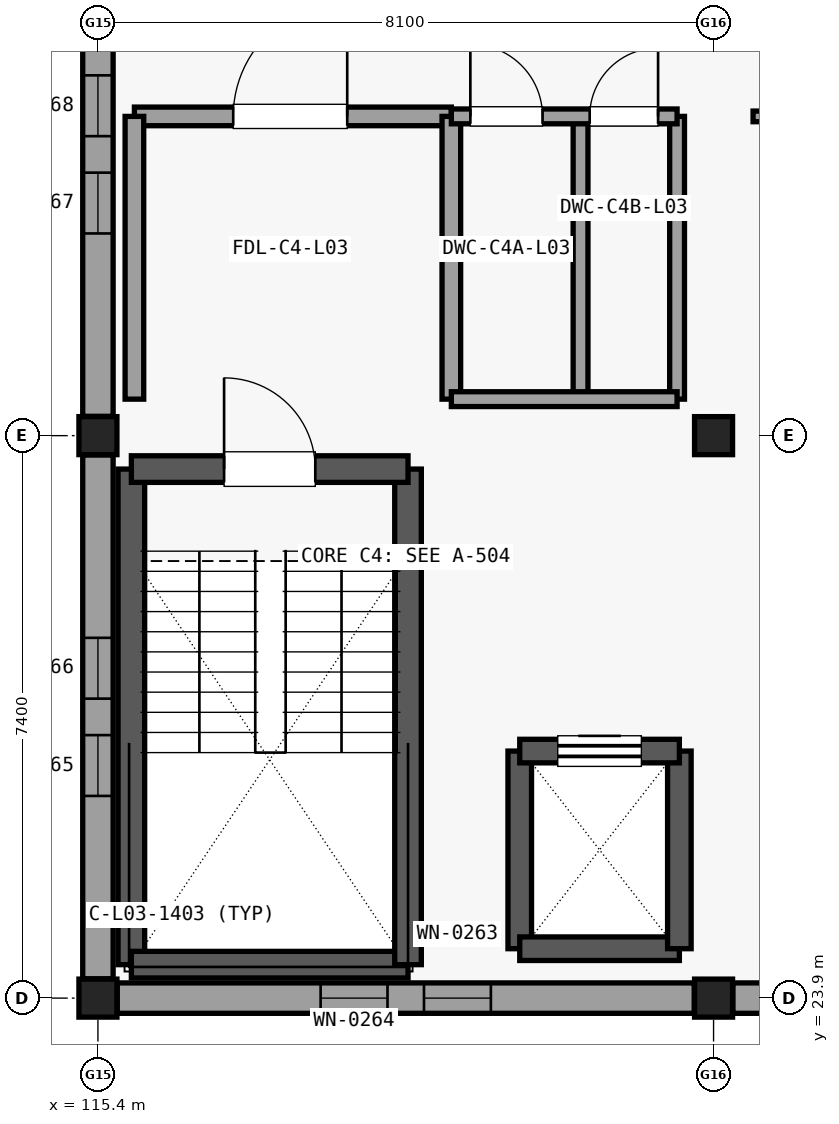
"""IFC4 building model, lengths in metres.
Left out: names, types, materials, properties, quantities, classifications, styles, units other than length and angle.
Written with IfcOpenShell. Run it as: python <this file> out.ifc"""

import sys

from ifc_helpers import new_model, si_unit, direction, frame, frame_2d, origin, origin_2d, place, context, subcontext, project, spatial, rectangle, extrude, element, fill, save


model = new_model("IFC4")
c1 = context("Model", 3, precision=1e-05, world=origin(), true_north=direction((0.0, 1.0)))
c2 = subcontext(c1, "Body", "Model", "MODEL_VIEW")
j1 = project(units=[si_unit("LENGTHUNIT", "METRE"), si_unit("PLANEANGLEUNIT", "RADIAN")], contexts=[c1])
p1 = place(None, origin())
s1 = spatial("IfcSite", under=j1, at=p1, CompositionType="ELEMENT")
p2 = place(p1, origin())
s2 = spatial("IfcBuilding", under=s1, at=p2, CompositionType="ELEMENT")
p3 = place(p2, frame((0.0, 0.0, 13.8)))
s3 = spatial("IfcBuildingStorey", under=s2, at=p3, CompositionType="ELEMENT", Elevation=13.8)
for number, where, z_axis, x_axis in (
    (1, (115.4, 23.9, 0.0), (0.0, 0.0, 1.0), (1.0, 0.0, 0.0)),
    (2, (115.4, 31.3, 0.0), (0.0, 0.0, 1.0), (1.0, 0.0, 0.0)),
    (3, (123.5, 23.9, 0.0), (0.0, 0.0, 1.0), (1.0, 0.0, 0.0)),
    (4, (123.5, 31.3, 0.0), (0.0, 0.0, 1.0), (1.0, 0.0, 0.0)),
):
    element("IfcColumn", number, at=place(p3, frame(where, z_axis=z_axis, x_axis=x_axis)), inside=s3, PredefinedType="COLUMN", context=c2, shape_type="SweptSolid", body=[
        extrude(rectangle(XDim=0.5, YDim=0.5, at=origin_2d()), origin(), (0.0, 0.0, 1.0), 3.38),
    ])
p4 = place(p3, frame((123.246, 23.9, 0.0), z_axis=(0.0, 0.0, 1.0), x_axis=(-1.0, 0.0, 0.0)))
e5 = element("IfcWall", 5, at=p4, inside=s3, PredefinedType="SOLIDWALL", context=c2, shape_type="SweptSolid", body=[
    extrude(rectangle(XDim=7.592, YDim=0.4, at=frame_2d((3.796, 0.0))), origin(), (0.0, 0.0, 1.0), 2.908),
])
p5 = place(p4, frame((2.676, 0.0, 0.6)))
e6 = element("IfcOpeningElement", 6, at=p5, cuts=e5, PredefinedType="OPENING", context=c2, shape_type="SweptSolid", body=[
    extrude(rectangle(XDim=0.88, YDim=1.9, at=frame_2d((0.44, 0.95))), frame((0.0, 0.21, 0.0), z_axis=(0.0, -1.0, 0.0), x_axis=(1.0, 0.0, 0.0)), (0.0, 0.0, 1.0), 0.42),
])
p6 = place(p4, frame((4.036, 0.0, 0.6)))
e7 = element("IfcOpeningElement", 7, at=p6, cuts=e5, PredefinedType="OPENING", context=c2, shape_type="SweptSolid", body=[
    extrude(rectangle(XDim=0.88, YDim=1.9, at=frame_2d((0.44, 0.95))), frame((0.0, 0.21, 0.0), z_axis=(0.0, -1.0, 0.0), x_axis=(1.0, 0.0, 0.0)), (0.0, 0.0, 1.0), 0.42),
])
p7 = place(p3, frame((115.4, 24.154, 0.0), z_axis=(0.0, 0.0, 1.0), x_axis=(0.0, 1.0, 0.0)))
e8 = element("IfcWall", 8, at=p7, inside=s3, PredefinedType="SOLIDWALL", context=c2, shape_type="SweptSolid", body=[
    extrude(rectangle(XDim=6.892, YDim=0.4, at=frame_2d((3.446, 0.0))), origin(), (0.0, 0.0, 1.0), 2.908),
])
p8 = place(p7, frame((2.406, 0.0, 0.6)))
e9 = element("IfcOpeningElement", 9, at=p8, cuts=e8, PredefinedType="OPENING", context=c2, shape_type="SweptSolid", body=[
    extrude(rectangle(XDim=0.8, YDim=1.92, at=frame_2d((0.4, 0.96))), frame((0.0, 0.21, 0.0), z_axis=(0.0, -1.0, 0.0), x_axis=(1.0, 0.0, 0.0)), (0.0, 0.0, 1.0), 0.42),
])
p9 = place(p7, frame((3.686, 0.0, 0.6)))
e10 = element("IfcOpeningElement", 10, at=p9, cuts=e8, PredefinedType="OPENING", context=c2, shape_type="SweptSolid", body=[
    extrude(rectangle(XDim=0.8, YDim=1.92, at=frame_2d((0.4, 0.96))), frame((0.0, 0.21, 0.0), z_axis=(0.0, -1.0, 0.0), x_axis=(1.0, 0.0, 0.0)), (0.0, 0.0, 1.0), 0.42),
])
p10 = place(p3, frame((115.4, 31.554, 0.0), z_axis=(0.0, 0.0, 1.0), x_axis=(0.0, 1.0, 0.0)))
e11 = element("IfcWall", 11, at=p10, inside=s3, PredefinedType="SOLIDWALL", context=c2, shape_type="SweptSolid", body=[
    extrude(rectangle(XDim=6.892, YDim=0.4, at=frame_2d((3.446, 0.0))), origin(), (0.0, 0.0, 1.0), 2.908),
])
p11 = place(p10, frame((2.406, 0.0, 0.6)))
e12 = element("IfcOpeningElement", 12, at=p11, cuts=e11, PredefinedType="OPENING", context=c2, shape_type="SweptSolid", body=[
    extrude(rectangle(XDim=0.8, YDim=1.92, at=frame_2d((0.4, 0.96))), frame((0.0, 0.21, 0.0), z_axis=(0.0, -1.0, 0.0), x_axis=(1.0, 0.0, 0.0)), (0.0, 0.0, 1.0), 0.42),
])
p12 = place(p10, frame((3.686, 0.0, 0.6)))
e13 = element("IfcOpeningElement", 13, at=p12, cuts=e11, PredefinedType="OPENING", context=c2, shape_type="SweptSolid", body=[
    extrude(rectangle(XDim=0.8, YDim=1.92, at=frame_2d((0.4, 0.96))), frame((0.0, 0.21, 0.0), z_axis=(0.0, -1.0, 0.0), x_axis=(1.0, 0.0, 0.0)), (0.0, 0.0, 1.0), 0.42),
])
p13 = place(p3, frame((131.346, 23.9, 0.0), z_axis=(0.0, 0.0, 1.0), x_axis=(-1.0, 0.0, 0.0)))
e14 = element("IfcWall", 14, at=p13, inside=s3, PredefinedType="SOLIDWALL", context=c2, shape_type="SweptSolid", body=[
    extrude(rectangle(XDim=7.592, YDim=0.4, at=frame_2d((3.796, 0.0))), origin(), (0.0, 0.0, 1.0), 2.908),
])
p14 = place(p13, frame((2.676, 0.0, 0.6)))
e15 = element("IfcOpeningElement", 15, at=p14, cuts=e14, PredefinedType="OPENING", context=c2, shape_type="SweptSolid", body=[
    extrude(rectangle(XDim=0.88, YDim=1.9, at=frame_2d((0.44, 0.95))), frame((0.0, 0.21, 0.0), z_axis=(0.0, -1.0, 0.0), x_axis=(1.0, 0.0, 0.0)), (0.0, 0.0, 1.0), 0.42),
])
p15 = place(p13, frame((4.036, 0.0, 0.6)))
e16 = element("IfcOpeningElement", 16, at=p15, cuts=e14, PredefinedType="OPENING", context=c2, shape_type="SweptSolid", body=[
    extrude(rectangle(XDim=0.88, YDim=1.9, at=frame_2d((0.44, 0.95))), frame((0.0, 0.21, 0.0), z_axis=(0.0, -1.0, 0.0), x_axis=(1.0, 0.0, 0.0)), (0.0, 0.0, 1.0), 0.42),
])
p16 = place(p3, frame((115.84, 24.34, 0.0), z_axis=(0.0, 0.0, 1.0), x_axis=(0.0, 1.0, 0.0)))
e17 = element("IfcWall", 17, at=p16, inside=s3, PredefinedType="SHEAR", context=c2, shape_type="SweptSolid", body=[
    extrude(rectangle(XDim=6.52, YDim=0.35, at=frame_2d((3.26, 0.0))), origin(), (0.0, 0.0, 1.0), 3.375),
])
p17 = place(p3, frame((115.84, 24.34, 0.0), z_axis=(0.0, 0.0, 1.0), x_axis=(1.0, 0.0, 0.0)))
e18 = element("IfcWall", 18, at=p17, inside=s3, PredefinedType="SHEAR", context=c2, shape_type="SweptSolid", body=[
    extrude(rectangle(XDim=3.64, YDim=0.35, at=frame_2d((1.82, 0.0))), origin(), (0.0, 0.0, 1.0), 3.375),
])
p18 = place(p3, frame((119.48, 24.34, 0.0), z_axis=(0.0, 0.0, 1.0), x_axis=(0.0, 1.0, 0.0)))
e19 = element("IfcWall", 19, at=p18, inside=s3, PredefinedType="SHEAR", context=c2, shape_type="SweptSolid", body=[
    extrude(rectangle(XDim=6.52, YDim=0.35, at=frame_2d((3.26, 0.0))), origin(), (0.0, 0.0, 1.0), 3.375),
])
p19 = place(p3, frame((115.84, 30.86, 0.0), z_axis=(0.0, 0.0, 1.0), x_axis=(1.0, 0.0, 0.0)))
e20 = element("IfcWall", 20, at=p19, inside=s3, PredefinedType="SHEAR", context=c2, shape_type="SweptSolid", body=[
    extrude(rectangle(XDim=3.64, YDim=0.35, at=frame_2d((1.82, 0.0))), origin(), (0.0, 0.0, 1.0), 3.375),
])
p20 = place(p19, frame((1.22, 0.0, 0.0)))
e21 = element("IfcOpeningElement", 21, at=p20, cuts=e20, PredefinedType="OPENING", context=c2, shape_type="SweptSolid", body=[
    extrude(rectangle(XDim=1.2, YDim=2.15, at=frame_2d((0.6, 1.075))), frame((0.0, 0.185, 0.0), z_axis=(0.0, -1.0, 0.0), x_axis=(1.0, 0.0, 0.0)), (0.0, 0.0, 1.0), 0.37),
])
p21 = place(p3, frame((120.95, 24.55, 0.0), z_axis=(0.0, 0.0, 1.0), x_axis=(0.0, 1.0, 0.0)))
e22 = element("IfcWall", 22, at=p21, inside=s3, PredefinedType="SHEAR", context=c2, shape_type="SweptSolid", body=[
    extrude(rectangle(XDim=2.6, YDim=0.31, at=frame_2d((1.3, 0.0))), origin(), (0.0, 0.0, 1.0), 3.375),
])
p22 = place(p3, frame((120.95, 24.55, 0.0), z_axis=(0.0, 0.0, 1.0), x_axis=(1.0, 0.0, 0.0)))
e23 = element("IfcWall", 23, at=p22, inside=s3, PredefinedType="SHEAR", context=c2, shape_type="SweptSolid", body=[
    extrude(rectangle(XDim=2.1, YDim=0.31, at=frame_2d((1.05, 0.0))), origin(), (0.0, 0.0, 1.0), 3.375),
])
p23 = place(p3, frame((123.05, 24.55, 0.0), z_axis=(0.0, 0.0, 1.0), x_axis=(0.0, 1.0, 0.0)))
e24 = element("IfcWall", 24, at=p23, inside=s3, PredefinedType="SHEAR", context=c2, shape_type="SweptSolid", body=[
    extrude(rectangle(XDim=2.6, YDim=0.31, at=frame_2d((1.3, 0.0))), origin(), (0.0, 0.0, 1.0), 3.375),
])
p24 = place(p3, frame((120.95, 27.15, 0.0), z_axis=(0.0, 0.0, 1.0), x_axis=(1.0, 0.0, 0.0)))
e25 = element("IfcWall", 25, at=p24, inside=s3, PredefinedType="SHEAR", context=c2, shape_type="SweptSolid", body=[
    extrude(rectangle(XDim=2.1, YDim=0.31, at=frame_2d((1.05, 0.0))), origin(), (0.0, 0.0, 1.0), 3.375),
])
p25 = place(p24, frame((0.5, 0.0, 0.0)))
e26 = element("IfcOpeningElement", 26, at=p25, cuts=e25, PredefinedType="OPENING", context=c2, shape_type="SweptSolid", body=[
    extrude(rectangle(XDim=1.1, YDim=2.15, at=frame_2d((0.55, 1.075))), frame((0.0, 0.165, 0.0), z_axis=(0.0, -1.0, 0.0), x_axis=(1.0, 0.0, 0.0)), (0.0, 0.0, 1.0), 0.33),
])
p26 = place(p3, frame((115.88, 35.5, 0.0), z_axis=(0.0, 0.0, 1.0), x_axis=(1.0, 0.0, 0.0)))
e27 = element("IfcWall", 27, at=p26, inside=s3, PredefinedType="PARTITIONING", context=c2, shape_type="SweptSolid", body=[
    extrude(rectangle(XDim=4.17, YDim=0.245, at=frame_2d((2.085, 0.0))), origin(), (0.0, 0.0, 1.0), 2.913),
])
p27 = place(p26, frame((1.3, 0.0, 0.0)))
e28 = element("IfcOpeningElement", 28, at=p27, cuts=e27, PredefinedType="OPENING", context=c2, shape_type="SweptSolid", body=[
    extrude(rectangle(XDim=1.5, YDim=2.15, at=frame_2d((0.75, 1.075))), frame((0.0, 0.133, 0.0), z_axis=(0.0, -1.0, 0.0), x_axis=(1.0, 0.0, 0.0)), (0.0, 0.0, 1.0), 0.265),
])
for number, where, z_axis, x_axis in (
    (29, (115.88, 31.78, 0.0), (0.0, 0.0, 1.0), (0.0, 1.0, 0.0)),
    (30, (120.05, 31.78, 0.0), (0.0, 0.0, 1.0), (0.0, 1.0, 0.0)),
):
    element("IfcWall", number, at=place(p3, frame(where, z_axis=z_axis, x_axis=x_axis)), inside=s3, PredefinedType="PARTITIONING", context=c2, shape_type="SweptSolid", body=[
        extrude(rectangle(XDim=3.72, YDim=0.245, at=frame_2d((1.86, 0.0))), origin(), (0.0, 0.0, 1.0), 2.913),
    ])
for number, where, z_axis, x_axis in (
    (31, (121.75, 31.78, 0.0), (0.0, 0.0, 1.0), (0.0, 1.0, 0.0)),
    (32, (123.02, 31.78, 0.0), (0.0, 0.0, 1.0), (0.0, 1.0, 0.0)),
):
    element("IfcWall", number, at=place(p3, frame(where, z_axis=z_axis, x_axis=x_axis)), inside=s3, PredefinedType="PARTITIONING", context=c2, shape_type="SweptSolid", body=[
        extrude(rectangle(XDim=3.72, YDim=0.195, at=frame_2d((1.86, 0.0))), origin(), (0.0, 0.0, 1.0), 2.913),
    ])
p28 = place(p3, frame((120.05, 31.78, 0.0), z_axis=(0.0, 0.0, 1.0), x_axis=(1.0, 0.0, 0.0)))
e33 = element("IfcWall", 33, at=p28, inside=s3, PredefinedType="PARTITIONING", context=c2, shape_type="SweptSolid", body=[
    extrude(rectangle(XDim=2.97, YDim=0.195, at=frame_2d((1.485, 0.0))), origin(), (0.0, 0.0, 1.0), 2.913),
])
p29 = place(p3, frame((120.05, 35.5, 0.0), z_axis=(0.0, 0.0, 1.0), x_axis=(1.0, 0.0, 0.0)))
e34 = element("IfcWall", 34, at=p29, inside=s3, PredefinedType="PARTITIONING", context=c2, shape_type="SweptSolid", body=[
    extrude(rectangle(XDim=2.97, YDim=0.195, at=frame_2d((1.485, 0.0))), origin(), (0.0, 0.0, 1.0), 2.913),
])
p30 = place(p29, frame((0.25, 0.0, 0.0)))
e35 = element("IfcOpeningElement", 35, at=p30, cuts=e34, PredefinedType="OPENING", context=c2, shape_type="SweptSolid", body=[
    extrude(rectangle(XDim=0.95, YDim=2.1, at=frame_2d((0.475, 1.05))), frame((0.0, 0.107, 0.0), z_axis=(0.0, -1.0, 0.0), x_axis=(1.0, 0.0, 0.0)), (0.0, 0.0, 1.0), 0.215),
])
p31 = place(p29, frame((1.82, 0.0, 0.0)))
e36 = element("IfcOpeningElement", 36, at=p31, cuts=e34, PredefinedType="OPENING", context=c2, shape_type="SweptSolid", body=[
    extrude(rectangle(XDim=0.9, YDim=2.1, at=frame_2d((0.45, 1.05))), frame((0.0, 0.107, 0.0), z_axis=(0.0, -1.0, 0.0), x_axis=(1.0, 0.0, 0.0)), (0.0, 0.0, 1.0), 0.215),
])
p32 = place(p3, frame((124.02, 35.5, 0.0), z_axis=(0.0, 0.0, 1.0), x_axis=(1.0, 0.0, 0.0)))
e37 = element("IfcWall", 37, at=p32, inside=s3, PredefinedType="PARTITIONING", context=c2, shape_type="SweptSolid", body=[
    extrude(rectangle(XDim=7.06, YDim=0.14, at=frame_2d((3.53, 0.0))), origin(), (0.0, 0.0, 1.0), 2.913),
])
p33 = place(p32, frame((3.03, 0.0, 0.0)))
e38 = element("IfcOpeningElement", 38, at=p33, cuts=e37, PredefinedType="OPENING", context=c2, shape_type="SweptSolid", body=[
    extrude(rectangle(XDim=1.0, YDim=2.12, at=frame_2d((0.5, 1.06))), frame((0.0, 0.08, 0.0), z_axis=(0.0, -1.0, 0.0), x_axis=(1.0, 0.0, 0.0)), (0.0, 0.0, 1.0), 0.16),
])
p34 = place(p5, origin())
e39 = element("IfcWindow", 39, at=p34, inside=s3, PartitioningType="SINGLE_PANEL", PredefinedType="WINDOW", context=c2, shape_type="SweptSolid", body=[
    extrude(rectangle(XDim=0.88, YDim=1.9, at=frame_2d((0.44, 0.95))), frame((0.0, 0.03, 0.0), z_axis=(0.0, -1.0, 0.0), x_axis=(1.0, 0.0, 0.0)), (0.0, 0.0, 1.0), 0.06),
])
fill(e6, e39)
p35 = place(p6, origin())
e40 = element("IfcWindow", 40, at=p35, inside=s3, PartitioningType="SINGLE_PANEL", PredefinedType="WINDOW", context=c2, shape_type="SweptSolid", body=[
    extrude(rectangle(XDim=0.88, YDim=1.9, at=frame_2d((0.44, 0.95))), frame((0.0, 0.03, 0.0), z_axis=(0.0, -1.0, 0.0), x_axis=(1.0, 0.0, 0.0)), (0.0, 0.0, 1.0), 0.06),
])
fill(e7, e40)
p36 = place(p8, origin())
e41 = element("IfcWindow", 41, at=p36, inside=s3, PartitioningType="SINGLE_PANEL", PredefinedType="WINDOW", context=c2, shape_type="SweptSolid", body=[
    extrude(rectangle(XDim=0.8, YDim=1.92, at=frame_2d((0.4, 0.96))), frame((0.0, 0.03, 0.0), z_axis=(0.0, -1.0, 0.0), x_axis=(1.0, 0.0, 0.0)), (0.0, 0.0, 1.0), 0.06),
])
fill(e9, e41)
p37 = place(p9, origin())
e42 = element("IfcWindow", 42, at=p37, inside=s3, PartitioningType="SINGLE_PANEL", PredefinedType="WINDOW", context=c2, shape_type="SweptSolid", body=[
    extrude(rectangle(XDim=0.8, YDim=1.92, at=frame_2d((0.4, 0.96))), frame((0.0, 0.03, 0.0), z_axis=(0.0, -1.0, 0.0), x_axis=(1.0, 0.0, 0.0)), (0.0, 0.0, 1.0), 0.06),
])
fill(e10, e42)
p38 = place(p11, origin())
e43 = element("IfcWindow", 43, at=p38, inside=s3, PartitioningType="SINGLE_PANEL", PredefinedType="WINDOW", context=c2, shape_type="SweptSolid", body=[
    extrude(rectangle(XDim=0.8, YDim=1.92, at=frame_2d((0.4, 0.96))), frame((0.0, 0.03, 0.0), z_axis=(0.0, -1.0, 0.0), x_axis=(1.0, 0.0, 0.0)), (0.0, 0.0, 1.0), 0.06),
])
fill(e12, e43)
p39 = place(p12, origin())
e44 = element("IfcWindow", 44, at=p39, inside=s3, PartitioningType="SINGLE_PANEL", PredefinedType="WINDOW", context=c2, shape_type="SweptSolid", body=[
    extrude(rectangle(XDim=0.8, YDim=1.92, at=frame_2d((0.4, 0.96))), frame((0.0, 0.03, 0.0), z_axis=(0.0, -1.0, 0.0), x_axis=(1.0, 0.0, 0.0)), (0.0, 0.0, 1.0), 0.06),
])
fill(e13, e44)
p40 = place(p20, origin())
e45 = element("IfcDoor", 45, at=p40, inside=s3, OperationType="SINGLE_SWING_LEFT", PredefinedType="DOOR", context=c2, shape_type="SweptSolid", body=[
    extrude(rectangle(XDim=1.2, YDim=2.15, at=frame_2d((0.6, 1.075))), frame((0.0, 0.025, 0.0), z_axis=(0.0, -1.0, 0.0), x_axis=(1.0, 0.0, 0.0)), (0.0, 0.0, 1.0), 0.05),
])
fill(e21, e45)
p41 = place(p25, origin())
e46 = element("IfcDoor", 46, at=p41, inside=s3, OperationType="SLIDING_TO_LEFT", PredefinedType="DOOR", context=c2, shape_type="SweptSolid", body=[
    extrude(rectangle(XDim=1.1, YDim=2.15, at=frame_2d((0.55, 1.075))), frame((0.0, 0.025, 0.0), z_axis=(0.0, -1.0, 0.0), x_axis=(1.0, 0.0, 0.0)), (0.0, 0.0, 1.0), 0.05),
])
fill(e26, e46)
p42 = place(p27, origin())
e47 = element("IfcDoor", 47, at=p42, inside=s3, OperationType="SINGLE_SWING_RIGHT", PredefinedType="DOOR", context=c2, shape_type="SweptSolid", body=[
    extrude(rectangle(XDim=1.5, YDim=2.15, at=frame_2d((0.75, 1.075))), frame((0.0, 0.025, 0.0), z_axis=(0.0, -1.0, 0.0), x_axis=(1.0, 0.0, 0.0)), (0.0, 0.0, 1.0), 0.05),
])
fill(e28, e47)
p43 = place(p30, origin())
e48 = element("IfcDoor", 48, at=p43, inside=s3, OperationType="SINGLE_SWING_LEFT", PredefinedType="DOOR", context=c2, shape_type="SweptSolid", body=[
    extrude(rectangle(XDim=0.95, YDim=2.1, at=frame_2d((0.475, 1.05))), frame((0.0, 0.025, 0.0), z_axis=(0.0, -1.0, 0.0), x_axis=(1.0, 0.0, 0.0)), (0.0, 0.0, 1.0), 0.05),
])
fill(e35, e48)
p44 = place(p31, origin())
e49 = element("IfcDoor", 49, at=p44, inside=s3, OperationType="SINGLE_SWING_RIGHT", PredefinedType="DOOR", context=c2, shape_type="SweptSolid", body=[
    extrude(rectangle(XDim=0.9, YDim=2.1, at=frame_2d((0.45, 1.05))), frame((0.0, 0.025, 0.0), z_axis=(0.0, -1.0, 0.0), x_axis=(1.0, 0.0, 0.0)), (0.0, 0.0, 1.0), 0.05),
])
fill(e36, e49)
save(model, sys.argv[1])
